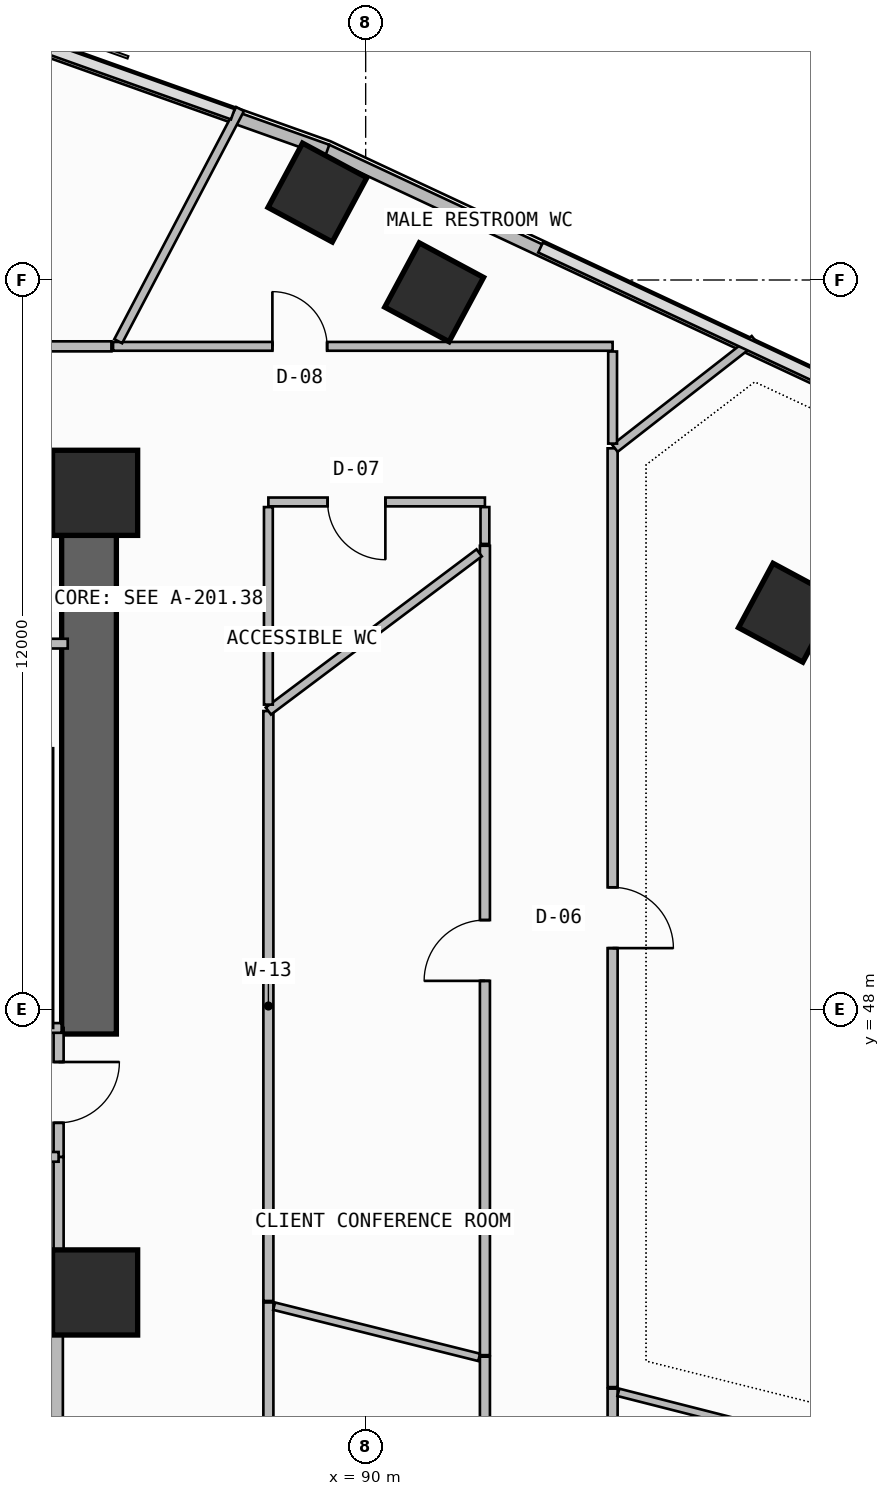
"""IFC4 building model, lengths in metres.
Left out: names, types, materials, properties, quantities, classifications, styles, units other than length and angle.
Written with IfcOpenShell. Run it as: python <this file> out.ifc"""

import sys

from ifc_helpers import new_model, si_unit, direction, frame, frame_2d, origin, origin_2d, place, context, subcontext, project, spatial, rectangle, extrude, element, fill, save


model = new_model("IFC4")
c1 = context("Model", 3, precision=1e-05, world=origin(), true_north=direction((0.0, 1.0)))
c2 = subcontext(c1, "Body", "Model", "MODEL_VIEW")
j1 = project(units=[si_unit("LENGTHUNIT", "METRE"), si_unit("PLANEANGLEUNIT", "RADIAN")], contexts=[c1])
p1 = place(None, origin())
s1 = spatial("IfcSite", under=j1, at=p1, CompositionType="ELEMENT")
p2 = place(p1, origin())
s2 = spatial("IfcBuilding", under=s1, at=p2, CompositionType="ELEMENT")
p3 = place(p2, frame((0.0, 0.0, 135.9)))
s3 = spatial("IfcBuildingStorey", under=s2, at=p3, CompositionType="ELEMENT", Elevation=135.9)
p4 = place(p3, frame((72.0, 56.5, -0.26), z_axis=(0.0, 0.0, 1.0), x_axis=(1.0, 0.0, 0.0)))
e1 = element("IfcWall", 1, at=p4, inside=s3, PredefinedType="SHEAR", context=c2, shape_type="SweptSolid", body=[
    extrude(rectangle(XDim=13.9, YDim=0.9, at=frame_2d((6.95, 0.0))), origin(), (0.0, 0.0, 1.0), 3.6),
])
p5 = place(p3, frame((85.45, 47.6, -0.26), z_axis=(0.0, 0.0, 1.0), x_axis=(0.0, 1.0, 0.0)))
e2 = element("IfcWall", 2, at=p5, inside=s3, PredefinedType="SHEAR", context=c2, shape_type="SweptSolid", body=[
    extrude(rectangle(XDim=8.45, YDim=0.9, at=frame_2d((4.225, 0.0))), origin(), (0.0, 0.0, 1.0), 3.6),
])
for number, where, z_axis, x_axis in (
    (3, (85.55, 43.35, 0.0), (0.0, 0.0, 1.0), (1.0, 0.0, 0.0)),
    (4, (85.55, 56.5, 0.0), (0.0, 0.0, 1.0), (1.0, 0.0, 0.0)),
):
    element("IfcColumn", number, at=place(p3, frame(where, z_axis=z_axis, x_axis=x_axis)), inside=s3, PredefinedType="COLUMN", context=c2, shape_type="SweptSolid", body=[
        extrude(rectangle(XDim=1.4, YDim=1.4, at=origin_2d()), origin(), (0.0, 0.0, 1.0), 3.6),
    ])
for number, where, z_axis, x_axis in (
    (5, (96.944, 54.528, 0.0), (0.0, 0.0, 1.0), (0.473, 0.881, 0.0)),
    (6, (91.126, 59.798, 0.0), (0.0, 0.0, 1.0), (0.473, 0.881, 0.0)),
    (7, (89.207, 61.438, 0.0), (0.0, 0.0, 1.0), (0.473, 0.881, 0.0)),
):
    element("IfcColumn", number, at=place(p3, frame(where, z_axis=z_axis, x_axis=x_axis)), inside=s3, PredefinedType="COLUMN", context=c2, shape_type="SweptSolid", body=[
        extrude(rectangle(XDim=1.2, YDim=1.2, at=origin_2d()), origin(), (0.0, 0.0, 1.0), 3.6),
    ])
p6 = place(p3, frame((97.062, 38.307, -0.26), z_axis=(0.0, 0.0, 1.0), x_axis=(0.957569832102, 0.288201347408, 0.0)))
e8 = element("IfcWall", 8, at=p6, inside=s3, PredefinedType="SHEAR", context=c2, shape_type="SweptSolid", body=[
    extrude(rectangle(XDim=13.199, YDim=0.7, at=frame_2d((6.6, 0.0))), origin(), (0.0, 0.0, 1.0), 3.6),
])
p7 = place(p3, frame((119.926, 47.843, 0.0), z_axis=(0.0, 0.0, 1.0), x_axis=(-0.905880730846, 0.423532881228, 0.0)))
e9 = element("IfcWall", 9, at=p7, inside=s3, PredefinedType="PARAPET", context=c2, shape_type="SweptSolid", body=[
    extrude(rectangle(XDim=33.748, YDim=0.2, at=frame_2d((16.874, 0.0))), origin(), (0.0, 0.0, 1.0), 1.15),
])
p8 = place(p3, frame((89.368, 62.13, 0.0), z_axis=(0.0, 0.0, 1.0), x_axis=(-0.942033439765, 0.335518998515, 0.0)))
e10 = element("IfcWall", 10, at=p8, inside=s3, PredefinedType="PARAPET", context=c2, shape_type="SweptSolid", body=[
    extrude(rectangle(XDim=27.969, YDim=0.2, at=frame_2d((13.985, 0.0))), origin(), (0.0, 0.0, 1.0), 1.15),
])
p9 = place(p3, frame((84.92, 38.85, 0.0), z_axis=(0.0, 0.0, 1.0), x_axis=(0.0, 1.0, 0.0)))
e11 = element("IfcWall", 11, at=p9, inside=s3, PredefinedType="SOLIDWALL", context=c2, shape_type="SweptSolid", body=[
    extrude(rectangle(XDim=4.83, YDim=0.2, at=frame_2d((2.415, 0.0))), origin(), (0.0, 0.0, 1.0), 3.34),
])
p10 = place(p9, frame((1.25, 0.0, 0.0)))
e12 = element("IfcOpeningElement", 12, at=p10, cuts=e11, PredefinedType="OPENING", context=c2, shape_type="SweptSolid", body=[
    extrude(rectangle(XDim=1.1, YDim=2.2, at=frame_2d((0.55, 1.1))), frame((0.0, 0.11, 0.0), z_axis=(0.0, -1.0, 0.0), x_axis=(1.0, 0.0, 0.0)), (0.0, 0.0, 1.0), 0.22),
])
p11 = place(p3, frame((84.95, 43.68, 0.0), z_axis=(0.0, 0.0, 1.0), x_axis=(0.0, 1.0, 0.0)))
e13 = element("IfcWall", 13, at=p11, inside=s3, PredefinedType="PLUMBINGWALL", context=c2, shape_type="SweptSolid", body=[
    extrude(rectangle(XDim=1.9, YDim=0.165, at=frame_2d((0.95, 0.0))), origin(), (0.0, 0.0, 1.0), 3.34),
])
p12 = place(p3, frame((84.95, 45.58, 0.0), z_axis=(0.0, 0.0, 1.0), x_axis=(0.0, 1.0, 0.0)))
e14 = element("IfcWall", 14, at=p12, inside=s3, PredefinedType="PARTITIONING", context=c2, shape_type="SweptSolid", body=[
    extrude(rectangle(XDim=2.12, YDim=0.165, at=frame_2d((1.06, 0.0))), origin(), (0.0, 0.0, 1.0), 3.34),
])
p13 = place(p12, frame((0.56, 0.0, 0.0)))
e15 = element("IfcOpeningElement", 15, at=p13, cuts=e14, PredefinedType="OPENING", context=c2, shape_type="SweptSolid", body=[
    extrude(rectangle(XDim=1.0, YDim=2.2, at=frame_2d((0.5, 1.1))), frame((0.0, 0.093, 0.0), z_axis=(0.0, -1.0, 0.0), x_axis=(1.0, 0.0, 0.0)), (0.0, 0.0, 1.0), 0.185),
])
p14 = place(p3, frame((80.72, 45.58, 0.0), z_axis=(0.0, 0.0, 1.0), x_axis=(1.0, 0.0, 0.0)))
e16 = element("IfcWall", 16, at=p14, inside=s3, PredefinedType="PLUMBINGWALL", context=c2, shape_type="SweptSolid", body=[
    extrude(rectangle(XDim=4.23, YDim=0.16, at=frame_2d((2.115, 0.0))), origin(), (0.0, 0.0, 1.0), 3.34),
])
p15 = place(p14, frame((1.65, 0.0, 0.0)))
e17 = element("IfcOpeningElement", 17, at=p15, cuts=e16, PredefinedType="OPENING", context=c2, shape_type="SweptSolid", body=[
    extrude(rectangle(XDim=0.9, YDim=2.1, at=frame_2d((0.45, 1.05))), frame((0.0, 0.09, 0.0), z_axis=(0.0, -1.0, 0.0), x_axis=(1.0, 0.0, 0.0)), (0.0, 0.0, 1.0), 0.18),
])
p16 = place(p3, frame((80.76, 43.68, 0.0), z_axis=(0.0, 0.0, 1.0), x_axis=(1.0, 0.0, 0.0)))
e18 = element("IfcWall", 18, at=p16, inside=s3, PredefinedType="PLUMBINGWALL", context=c2, shape_type="SweptSolid", body=[
    extrude(rectangle(XDim=4.19, YDim=0.16, at=frame_2d((2.095, 0.0))), origin(), (0.0, 0.0, 1.0), 3.34),
])
p17 = place(p3, frame((80.6, 47.7, 0.0), z_axis=(0.0, 0.0, 1.0), x_axis=(1.0, 0.0, 0.0)))
e19 = element("IfcWall", 19, at=p17, inside=s3, PredefinedType="SOLIDWALL", context=c2, shape_type="SweptSolid", body=[
    extrude(rectangle(XDim=4.4, YDim=0.16, at=frame_2d((2.2, 0.0))), origin(), (0.0, 0.0, 1.0), 3.34),
])
p18 = place(p3, frame((84.78, 47.7, 0.0), z_axis=(0.0, 0.0, 1.0), x_axis=(0.0, 1.0, 0.0)))
e20 = element("IfcWall", 20, at=p18, inside=s3, PredefinedType="SOLIDWALL", context=c2, shape_type="SweptSolid", body=[
    extrude(rectangle(XDim=4.6, YDim=0.16, at=frame_2d((2.3, 0.0))), origin(), (0.0, 0.0, 1.0), 3.34),
])
p19 = place(p3, frame((73.02, 54.02, 0.0), z_axis=(0.0, 0.0, 1.0), x_axis=(1.0, 0.0, 0.0)))
e21 = element("IfcWall", 21, at=p19, inside=s3, PredefinedType="SOLIDWALL", context=c2, shape_type="SweptSolid", body=[
    extrude(rectangle(XDim=12.08, YDim=0.16, at=frame_2d((6.04, 0.0))), origin(), (0.0, 0.0, 1.0), 3.34),
])
p20 = place(p3, frame((88.4, 37.057, 0.0), z_axis=(0.0, 0.0, 1.0), x_axis=(0.0, 1.0, 0.0)))
e22 = element("IfcWall", 22, at=p20, inside=s3, PredefinedType="PARTITIONING", context=c2, shape_type="SweptSolid", body=[
    extrude(rectangle(XDim=6.128, YDim=0.165, at=frame_2d((3.064, 0.0))), origin(), (0.0, 0.0, 1.0), 2.725),
])
p21 = place(p20, frame((2.564, 0.0, 0.0)))
e23 = element("IfcOpeningElement", 23, at=p21, cuts=e22, PredefinedType="OPENING", context=c2, shape_type="SweptSolid", body=[
    extrude(rectangle(XDim=1.0, YDim=2.2, at=frame_2d((0.5, 1.1))), frame((0.0, 0.093, 0.0), z_axis=(0.0, -1.0, 0.0), x_axis=(1.0, 0.0, 0.0)), (0.0, 0.0, 1.0), 0.185),
])
p22 = place(p3, frame((91.961, 42.294, 0.0), z_axis=(0.0, 0.0, 1.0), x_axis=(0.0, -1.0, 0.0)))
e24 = element("IfcWall", 24, at=p22, inside=s3, PredefinedType="PARTITIONING", context=c2, shape_type="SweptSolid", body=[
    extrude(rectangle(XDim=4.165, YDim=0.165, at=frame_2d((2.083, 0.0))), origin(), (0.0, 0.0, 1.0), 3.34),
])
p23 = place(p3, frame((94.061, 38.761, 0.0), z_axis=(0.0, 0.0, 1.0), x_axis=(0.0, 1.0, 0.0)))
e25 = element("IfcWall", 25, at=p23, inside=s3, PredefinedType="PARTITIONING", context=c2, shape_type="SweptSolid", body=[
    extrude(rectangle(XDim=3.007, YDim=0.165, at=frame_2d((1.504, 0.0))), origin(), (0.0, 0.0, 1.0), 3.34),
])
p24 = place(p3, frame((94.156, 41.707, 0.0), z_axis=(0.0, 0.0, 1.0), x_axis=(0.969165666748, -0.246410045243, 0.0)))
e26 = element("IfcWall", 26, at=p24, inside=s3, PredefinedType="PARTITIONING", context=c2, shape_type="SweptSolid", body=[
    extrude(rectangle(XDim=8.625, YDim=0.125, at=frame_2d((4.312, 0.0))), origin(), (0.0, 0.0, 1.0), 2.325),
])
p25 = place(p3, frame((88.494, 43.125, 0.0), z_axis=(0.0, 0.0, 1.0), x_axis=(0.970212698563, -0.242254658463, 0.0)))
e27 = element("IfcWall", 27, at=p25, inside=s3, PredefinedType="PARTITIONING", context=c2, shape_type="SweptSolid", body=[
    extrude(rectangle(XDim=3.476, YDim=0.125, at=frame_2d((1.738, 0.0))), origin(), (0.0, 0.0, 1.0), 2.725),
])
p26 = place(p3, frame((94.061, 41.793, 0.0), z_axis=(0.0, 0.0, 1.0), x_axis=(0.0, 1.0, 0.0)))
e28 = element("IfcWall", 28, at=p26, inside=s3, PredefinedType="PARTITIONING", context=c2, shape_type="SweptSolid", body=[
    extrude(rectangle(XDim=15.439, YDim=0.165, at=frame_2d((7.719, 0.0))), origin(), (0.0, 0.0, 1.0), 2.725),
])
p27 = place(p26, frame((7.219, 0.0, 0.0)))
e29 = element("IfcOpeningElement", 29, at=p27, cuts=e28, PredefinedType="OPENING", context=c2, shape_type="SweptSolid", body=[
    extrude(rectangle(XDim=1.0, YDim=2.2, at=frame_2d((0.5, 1.1))), frame((0.0, 0.093, 0.0), z_axis=(0.0, -1.0, 0.0), x_axis=(1.0, 0.0, 0.0)), (0.0, 0.0, 1.0), 0.185),
])
p28 = place(p3, frame((94.099, 57.232, 0.0), z_axis=(0.0, 0.0, 1.0), x_axis=(0.788447778752, 0.615101699056, 0.0)))
e30 = element("IfcWall", 30, at=p28, inside=s3, PredefinedType="PARTITIONING", context=c2, shape_type="SweptSolid", body=[
    extrude(rectangle(XDim=2.91, YDim=0.145, at=frame_2d((1.455, 0.0))), origin(), (0.0, 0.0, 1.0), 2.725),
])
p29 = place(p3, frame((91.961, 55.629, 0.0), z_axis=(0.0, 0.0, 1.0), x_axis=(0.0, -1.0, 0.0)))
e31 = element("IfcWall", 31, at=p29, inside=s3, PredefinedType="PARTITIONING", context=c2, shape_type="SweptSolid", body=[
    extrude(rectangle(XDim=13.311, YDim=0.165, at=frame_2d((6.655, 0.0))), origin(), (0.0, 0.0, 1.0), 2.725),
])
p30 = place(p29, frame((6.155, 0.0, 0.0)))
e32 = element("IfcOpeningElement", 32, at=p30, cuts=e31, PredefinedType="OPENING", context=c2, shape_type="SweptSolid", body=[
    extrude(rectangle(XDim=1.0, YDim=2.2, at=frame_2d((0.5, 1.1))), frame((0.0, 0.093, 0.0), z_axis=(0.0, -1.0, 0.0), x_axis=(1.0, 0.0, 0.0)), (0.0, 0.0, 1.0), 0.185),
])
p31 = place(p3, frame((88.4, 43.21, 0.0), z_axis=(0.0, 0.0, 1.0), x_axis=(0.0, 1.0, 0.0)))
e33 = element("IfcWall", 33, at=p31, inside=s3, PredefinedType="PARTITIONING", context=c2, shape_type="SweptSolid", body=[
    extrude(rectangle(XDim=9.701, YDim=0.165, at=frame_2d((4.851, 0.0))), origin(), (0.0, 0.0, 1.0), 2.725),
])
p32 = place(p3, frame((88.4, 52.911, 0.0), z_axis=(0.0, 0.0, 1.0), x_axis=(0.79981070922, 0.6002523048, 0.0)))
e34 = element("IfcWall", 34, at=p32, inside=s3, PredefinedType="PARTITIONING", context=c2, shape_type="SweptSolid", body=[
    extrude(rectangle(XDim=4.334, YDim=0.145, at=frame_2d((2.167, 0.0))), origin(), (0.0, 0.0, 1.0), 2.725),
])
p33 = place(p3, frame((88.4, 56.35, 0.0), z_axis=(0.0, 0.0, 1.0), x_axis=(1.0, 0.0, 0.0)))
e35 = element("IfcWall", 35, at=p33, inside=s3, PredefinedType="PARTITIONING", context=c2, shape_type="SweptSolid", body=[
    extrude(rectangle(XDim=3.561, YDim=0.145, at=frame_2d((1.781, 0.0))), origin(), (0.0, 0.0, 1.0), 2.925),
])
p34 = place(p33, frame((0.974, 0.0, 0.0)))
e36 = element("IfcOpeningElement", 36, at=p34, cuts=e35, PredefinedType="OPENING", context=c2, shape_type="SweptSolid", body=[
    extrude(rectangle(XDim=0.95, YDim=2.15, at=frame_2d((0.475, 1.075))), frame((0.0, 0.083, 0.0), z_axis=(0.0, -1.0, 0.0), x_axis=(1.0, 0.0, 0.0)), (0.0, 0.0, 1.0), 0.165),
])
p35 = place(p3, frame((88.4, 53.017, 0.0), z_axis=(0.0, 0.0, 1.0), x_axis=(0.0, 1.0, 0.0)))
e37 = element("IfcWall", 37, at=p35, inside=s3, PredefinedType="PARTITIONING", context=c2, shape_type="SweptSolid", body=[
    extrude(rectangle(XDim=3.248, YDim=0.145, at=frame_2d((1.624, 0.0))), origin(), (0.0, 0.0, 1.0), 2.725),
])
p36 = place(p3, frame((91.961, 56.265, 0.0), z_axis=(0.0, 0.0, 1.0), x_axis=(0.0, -1.0, 0.0)))
e38 = element("IfcWall", 38, at=p36, inside=s3, PredefinedType="PARTITIONING", context=c2, shape_type="SweptSolid", body=[
    extrude(rectangle(XDim=0.606, YDim=0.145, at=frame_2d((0.303, 0.0))), origin(), (0.0, 0.0, 1.0), 2.925),
])
p37 = place(p3, frame((94.061, 58.909, 0.0), z_axis=(0.0, 0.0, 1.0), x_axis=(-1.0, 0.0, 0.0)))
e39 = element("IfcWall", 39, at=p37, inside=s3, PredefinedType="PARTITIONING", context=c2, shape_type="SweptSolid", body=[
    extrude(rectangle(XDim=8.216, YDim=0.145, at=frame_2d((4.108, 0.0))), origin(), (0.0, 0.0, 1.0), 2.725),
])
p38 = place(p37, frame((4.695, 0.0, 0.0)))
e40 = element("IfcOpeningElement", 40, at=p38, cuts=e39, PredefinedType="OPENING", context=c2, shape_type="SweptSolid", body=[
    extrude(rectangle(XDim=0.9, YDim=2.1, at=frame_2d((0.45, 1.05))), frame((0.0, 0.083, 0.0), z_axis=(0.0, -1.0, 0.0), x_axis=(1.0, 0.0, 0.0)), (0.0, 0.0, 1.0), 0.165),
])
p39 = place(p3, frame((94.061, 57.309, 0.0), z_axis=(0.0, 0.0, 1.0), x_axis=(0.0, 1.0, 0.0)))
e41 = element("IfcWall", 41, at=p39, inside=s3, PredefinedType="PARTITIONING", context=c2, shape_type="SweptSolid", body=[
    extrude(rectangle(XDim=1.515, YDim=0.145, at=frame_2d((0.758, 0.0))), origin(), (0.0, 0.0, 1.0), 2.725),
])
p40 = place(p3, frame((85.93, 58.993, 0.0), z_axis=(0.0, 0.0, 1.0), x_axis=(0.464726248664, 0.885454410912, 0.0)))
e42 = element("IfcWall", 42, at=p40, inside=s3, PredefinedType="PARTITIONING", context=c2, shape_type="SweptSolid", body=[
    extrude(rectangle(XDim=4.312, YDim=0.145, at=frame_2d((2.156, 0.0))), origin(), (0.0, 0.0, 1.0), 3.34),
])
p41 = place(p3, frame((85.818, 58.909, 0.0), z_axis=(0.0, 0.0, 1.0), x_axis=(-1.0, 0.0, 0.0)))
e43 = element("IfcWall", 43, at=p41, inside=s3, PredefinedType="PARTITIONING", context=c2, shape_type="SweptSolid", body=[
    extrude(rectangle(XDim=12.806, YDim=0.165, at=frame_2d((6.403, 0.0))), origin(), (0.0, 0.0, 1.0), 3.34),
])
p42 = place(p41, frame((5.903, 0.0, 0.0)))
e44 = element("IfcOpeningElement", 44, at=p42, cuts=e43, PredefinedType="OPENING", context=c2, shape_type="SweptSolid", body=[
    extrude(rectangle(XDim=1.0, YDim=2.2, at=frame_2d((0.5, 1.1))), frame((0.0, 0.093, 0.0), z_axis=(0.0, -1.0, 0.0), x_axis=(1.0, 0.0, 0.0)), (0.0, 0.0, 1.0), 0.185),
])
p43 = place(p13, frame((1.0, 0.0, 0.0), z_axis=(0.0, 0.0, 1.0), x_axis=(-1.0, 0.0, 0.0)))
e45 = element("IfcDoor", 45, at=p43, inside=s3, OperationType="SINGLE_SWING_LEFT", PredefinedType="DOOR", context=c2, shape_type="SweptSolid", body=[
    extrude(rectangle(XDim=1.0, YDim=2.2, at=frame_2d((0.5, 1.1))), frame((0.0, 0.025, 0.0), z_axis=(0.0, -1.0, 0.0), x_axis=(1.0, 0.0, 0.0)), (0.0, 0.0, 1.0), 0.05),
])
fill(e15, e45)
p44 = place(p27, frame((1.0, 0.0, 0.0), z_axis=(0.0, 0.0, 1.0), x_axis=(-1.0, 0.0, 0.0)))
e46 = element("IfcDoor", 46, at=p44, inside=s3, OperationType="SINGLE_SWING_RIGHT", PredefinedType="DOOR", context=c2, shape_type="SweptSolid", body=[
    extrude(rectangle(XDim=1.0, YDim=2.2, at=frame_2d((0.5, 1.1))), frame((0.0, 0.025, 0.0), z_axis=(0.0, -1.0, 0.0), x_axis=(1.0, 0.0, 0.0)), (0.0, 0.0, 1.0), 0.05),
])
fill(e29, e46)
p45 = place(p30, frame((1.0, 0.0, 0.0), z_axis=(0.0, 0.0, 1.0), x_axis=(-1.0, 0.0, 0.0)))
e47 = element("IfcDoor", 47, at=p45, inside=s3, OperationType="SINGLE_SWING_LEFT", PredefinedType="DOOR", context=c2, shape_type="SweptSolid", body=[
    extrude(rectangle(XDim=1.0, YDim=2.2, at=frame_2d((0.5, 1.1))), frame((0.0, 0.025, 0.0), z_axis=(0.0, -1.0, 0.0), x_axis=(1.0, 0.0, 0.0)), (0.0, 0.0, 1.0), 0.05),
])
fill(e32, e47)
p46 = place(p34, frame((0.95, 0.0, 0.0), z_axis=(0.0, 0.0, 1.0), x_axis=(-1.0, 0.0, 0.0)))
e48 = element("IfcDoor", 48, at=p46, inside=s3, OperationType="SINGLE_SWING_LEFT", PredefinedType="DOOR", context=c2, shape_type="SweptSolid", body=[
    extrude(rectangle(XDim=0.95, YDim=2.15, at=frame_2d((0.475, 1.075))), frame((0.0, 0.025, 0.0), z_axis=(0.0, -1.0, 0.0), x_axis=(1.0, 0.0, 0.0)), (0.0, 0.0, 1.0), 0.05),
])
fill(e36, e48)
p47 = place(p38, frame((0.9, 0.0, 0.0), z_axis=(0.0, 0.0, 1.0), x_axis=(-1.0, 0.0, 0.0)))
e49 = element("IfcDoor", 49, at=p47, inside=s3, OperationType="SINGLE_SWING_LEFT", PredefinedType="DOOR", context=c2, shape_type="SweptSolid", body=[
    extrude(rectangle(XDim=0.9, YDim=2.1, at=frame_2d((0.45, 1.05))), frame((0.0, 0.025, 0.0), z_axis=(0.0, -1.0, 0.0), x_axis=(1.0, 0.0, 0.0)), (0.0, 0.0, 1.0), 0.05),
])
fill(e40, e49)
save(model, sys.argv[1])
